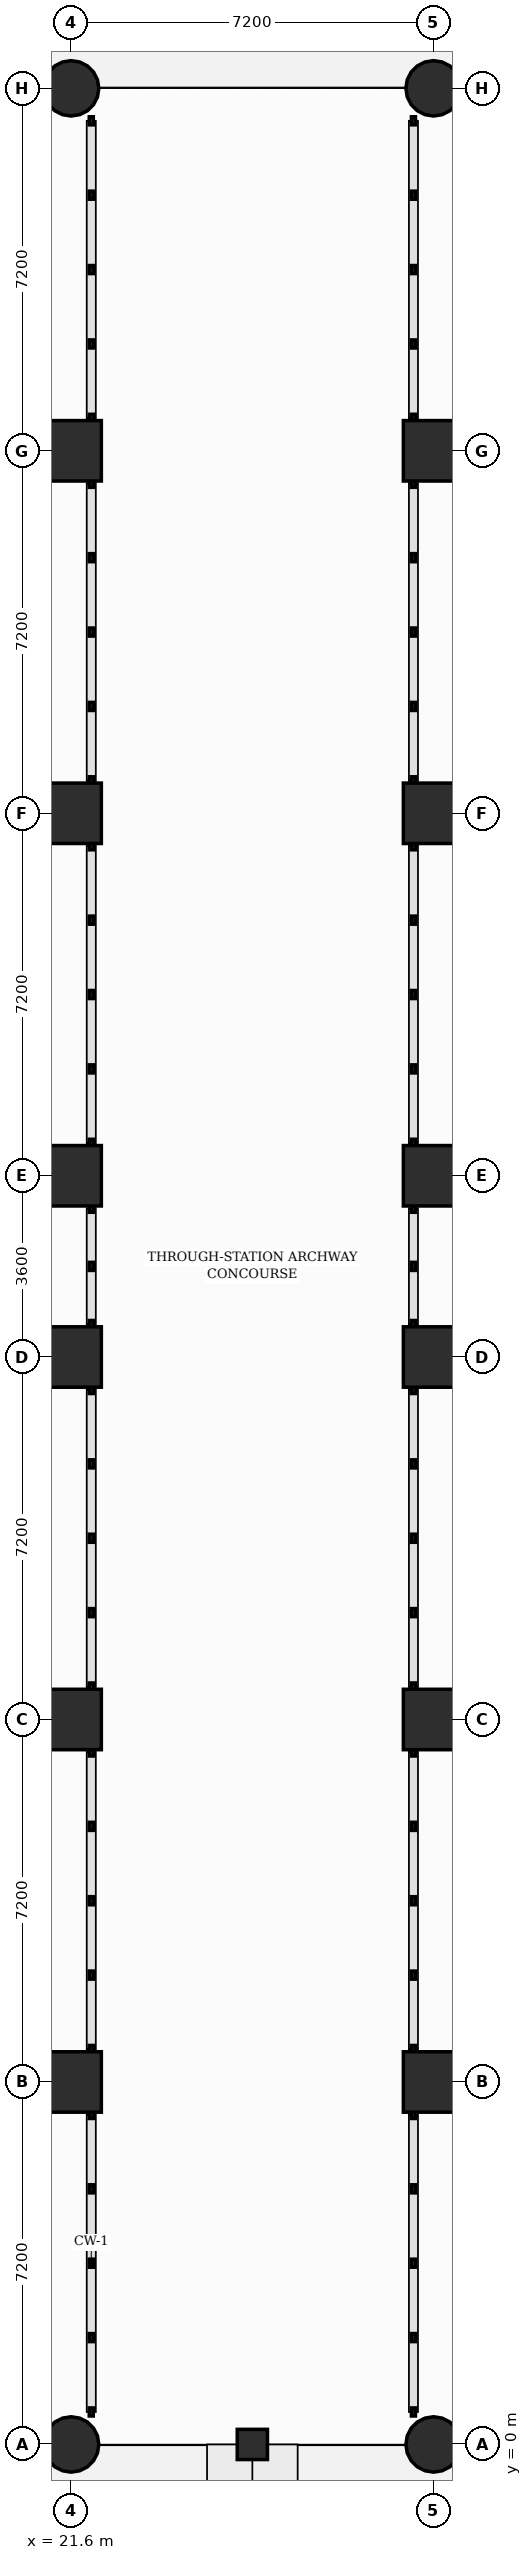
"""IFC4 building model, lengths in metres.
Left out: names, types, materials, properties, quantities, classifications, styles, units other than length and angle.
Written with IfcOpenShell. Run it as: python <this file> out.ifc"""

import sys

from ifc_helpers import new_model, si_unit, direction, frame, frame_2d, origin, origin_2d, place, context, subcontext, project, spatial, rectangle, circle, extrude, source, transform, mapped, element, save


model = new_model("IFC4")
c1 = context("Model", 3, precision=1e-05, world=origin(), true_north=direction((0.0, 1.0)))
c2 = subcontext(c1, "Body", "Model", "MODEL_VIEW")
j1 = project(units=[si_unit("LENGTHUNIT", "METRE"), si_unit("PLANEANGLEUNIT", "RADIAN")], contexts=[c1])
p1 = place(None, origin())
s1 = spatial("IfcSite", under=j1, at=p1, CompositionType="ELEMENT")
p2 = place(p1, origin())
s2 = spatial("IfcBuilding", under=s1, at=p2, CompositionType="ELEMENT")
p3 = place(p2, origin())
s3 = spatial("IfcBuildingStorey", under=s2, at=p3, CompositionType="ELEMENT", Elevation=0.0)
m1 = source(origin(), c2, "Body", "SweptSolid", [
    extrude(circle(Radius=0.55, at=origin_2d()), origin(), (0.0, 0.0, 1.0), 5.4),
])
p4 = place(p3, frame((21.6, 0.0, 0.0), z_axis=(0.0, 0.0, 1.0), x_axis=(1.0, 0.0, 0.0)))
e1 = element("IfcColumn", 1, at=p4, inside=s3, PredefinedType="COLUMN", context=c2, shape_type="MappedRepresentation", body=[
    mapped(m1, transform((0.0, 0.0, 0.0), scale=1.0)),
])
m2 = source(origin(), c2, "Body", "SweptSolid", [
    extrude(rectangle(XDim=1.2, YDim=1.2, at=origin_2d()), origin(), (0.0, 0.0, 1.0), 5.4),
])
for number, where, z_axis, x_axis in (
    (2, (21.6, 7.2, 0.0), (0.0, 0.0, 1.0), (1.0, 0.0, 0.0)),
    (3, (21.6, 14.4, 0.0), (0.0, 0.0, 1.0), (1.0, 0.0, 0.0)),
    (4, (21.6, 21.6, 0.0), (0.0, 0.0, 1.0), (1.0, 0.0, 0.0)),
    (5, (21.6, 25.2, 0.0), (0.0, 0.0, 1.0), (1.0, 0.0, 0.0)),
    (6, (21.6, 32.4, 0.0), (0.0, 0.0, 1.0), (1.0, 0.0, 0.0)),
    (7, (21.6, 39.6, 0.0), (0.0, 0.0, 1.0), (1.0, 0.0, 0.0)),
):
    element("IfcColumn", number, at=place(p3, frame(where, z_axis=z_axis, x_axis=x_axis)), inside=s3, PredefinedType="COLUMN", context=c2, shape_type="MappedRepresentation", body=[
        mapped(m2, transform((0.0, 0.0, 0.0), scale=1.0)),
    ])
for number, where, z_axis, x_axis in (
    (8, (21.6, 46.8, 0.0), (0.0, 0.0, 1.0), (1.0, 0.0, 0.0)),
    (9, (28.8, 0.0, 0.0), (0.0, 0.0, 1.0), (1.0, 0.0, 0.0)),
):
    element("IfcColumn", number, at=place(p3, frame(where, z_axis=z_axis, x_axis=x_axis)), inside=s3, PredefinedType="COLUMN", context=c2, shape_type="MappedRepresentation", body=[
        mapped(m1, transform((0.0, 0.0, 0.0), scale=1.0)),
    ])
for number, where, z_axis, x_axis in (
    (10, (28.8, 7.2, 0.0), (0.0, 0.0, 1.0), (1.0, 0.0, 0.0)),
    (11, (28.8, 14.4, 0.0), (0.0, 0.0, 1.0), (1.0, 0.0, 0.0)),
    (12, (28.8, 21.6, 0.0), (0.0, 0.0, 1.0), (1.0, 0.0, 0.0)),
    (13, (28.8, 25.2, 0.0), (0.0, 0.0, 1.0), (1.0, 0.0, 0.0)),
    (14, (28.8, 32.4, 0.0), (0.0, 0.0, 1.0), (1.0, 0.0, 0.0)),
    (15, (28.8, 39.6, 0.0), (0.0, 0.0, 1.0), (1.0, 0.0, 0.0)),
):
    element("IfcColumn", number, at=place(p3, frame(where, z_axis=z_axis, x_axis=x_axis)), inside=s3, PredefinedType="COLUMN", context=c2, shape_type="MappedRepresentation", body=[
        mapped(m2, transform((0.0, 0.0, 0.0), scale=1.0)),
    ])
p5 = place(p3, frame((28.8, 46.8, 0.0), z_axis=(0.0, 0.0, 1.0), x_axis=(1.0, 0.0, 0.0)))
e16 = element("IfcColumn", 16, at=p5, inside=s3, PredefinedType="COLUMN", context=c2, shape_type="MappedRepresentation", body=[
    mapped(m1, transform((0.0, 0.0, 0.0), scale=1.0)),
])
m3 = source(origin(), c2, "Body", "SweptSolid", [
    extrude(rectangle(XDim=0.6, YDim=0.6, at=origin_2d()), origin(), (0.0, 0.0, 1.0), 5.4),
])
p6 = place(p3, frame((25.2, 0.0, 0.0), z_axis=(0.0, 0.0, 1.0), x_axis=(1.0, 0.0, 0.0)))
e17 = element("IfcColumn", 17, at=p6, inside=s3, PredefinedType="PILASTER", context=c2, shape_type="MappedRepresentation", body=[
    mapped(m3, transform((0.0, 0.0, 0.0), scale=1.0)),
])
p7 = place(p3, frame((8.69, 14.35, 0.0), z_axis=(0.0, 0.0, 1.0), x_axis=(1.0, 0.0, 0.0)))
e18 = element("IfcWall", 18, at=p7, inside=s3, PredefinedType="PARTITIONING", context=c2, shape_type="SweptSolid", body=[
    extrude(rectangle(XDim=13.07, YDim=0.16, at=frame_2d((6.535, 0.0))), origin(), (0.0, 0.0, 1.0), 4.085),
])
p8 = place(p7, frame((7.71, 0.0, 0.0)))
e19 = element("IfcOpeningElement", 19, at=p8, cuts=e18, PredefinedType="OPENING", context=c2, shape_type="SweptSolid", body=[
    extrude(rectangle(XDim=1.6, YDim=2.4, at=frame_2d((0.8, 1.2))), frame((0.0, 0.09, 0.0), z_axis=(0.0, -1.0, 0.0), x_axis=(1.0, 0.0, 0.0)), (0.0, 0.0, 1.0), 0.18),
])
p9 = place(p3, frame((28.64, 14.35, 0.0), z_axis=(0.0, 0.0, 1.0), x_axis=(1.0, 0.0, 0.0)))
e20 = element("IfcWall", 20, at=p9, inside=s3, PredefinedType="PARTITIONING", context=c2, shape_type="SweptSolid", body=[
    extrude(rectangle(XDim=3.27, YDim=0.16, at=frame_2d((1.635, 0.0))), origin(), (0.0, 0.0, 1.0), 4.085),
])
p10 = place(p9, frame((0.935, 0.0, 0.0)))
e21 = element("IfcOpeningElement", 21, at=p10, cuts=e20, PredefinedType="OPENING", context=c2, shape_type="SweptSolid", body=[
    extrude(rectangle(XDim=1.4, YDim=2.35, at=frame_2d((0.7, 1.175))), frame((0.0, 0.09, 0.0), z_axis=(0.0, -1.0, 0.0), x_axis=(1.0, 0.0, 0.0)), (0.0, 0.0, 1.0), 0.18),
])
p11 = place(p3, frame((13.84, 39.6, 0.0), z_axis=(0.0, 0.0, 1.0), x_axis=(1.0, 0.0, 0.0)))
e22 = element("IfcWall", 22, at=p11, inside=s3, PredefinedType="PARTITIONING", context=c2, shape_type="SweptSolid", body=[
    extrude(rectangle(XDim=7.92, YDim=0.16, at=frame_2d((3.96, 0.0))), origin(), (0.0, 0.0, 1.0), 4.085),
])
p12 = place(p11, frame((1.22, 0.0, 0.0)))
e23 = element("IfcOpeningElement", 23, at=p12, cuts=e22, PredefinedType="OPENING", context=c2, shape_type="SweptSolid", body=[
    extrude(rectangle(XDim=1.6, YDim=2.4, at=frame_2d((0.8, 1.2))), frame((0.0, 0.09, 0.0), z_axis=(0.0, -1.0, 0.0), x_axis=(1.0, 0.0, 0.0)), (0.0, 0.0, 1.0), 0.18),
])
p13 = place(p3, frame((28.64, 39.6, 0.0), z_axis=(0.0, 0.0, 1.0), x_axis=(1.0, 0.0, 0.0)))
e24 = element("IfcWall", 24, at=p13, inside=s3, PredefinedType="PARTITIONING", context=c2, shape_type="SweptSolid", body=[
    extrude(rectangle(XDim=43.72, YDim=0.16, at=frame_2d((21.86, 0.0))), origin(), (0.0, 0.0, 1.0), 4.085),
])
p14 = place(p13, frame((7.76, 0.0, 0.0)))
e25 = element("IfcOpeningElement", 25, at=p14, cuts=e24, PredefinedType="OPENING", context=c2, shape_type="SweptSolid", body=[
    extrude(rectangle(XDim=1.6, YDim=2.4, at=frame_2d((0.8, 1.2))), frame((0.0, 0.09, 0.0), z_axis=(0.0, -1.0, 0.0), x_axis=(1.0, 0.0, 0.0)), (0.0, 0.0, 1.0), 0.18),
])
p15 = place(p13, frame((22.835, 0.0, 0.0)))
e26 = element("IfcOpeningElement", 26, at=p15, cuts=e24, PredefinedType="OPENING", context=c2, shape_type="SweptSolid", body=[
    extrude(rectangle(XDim=0.85, YDim=2.1, at=frame_2d((0.425, 1.05))), frame((0.0, 0.09, 0.0), z_axis=(0.0, -1.0, 0.0), x_axis=(1.0, 0.0, 0.0)), (0.0, 0.0, 1.0), 0.18),
])
p16 = place(p13, frame((30.835, 0.0, 0.0)))
e27 = element("IfcOpeningElement", 27, at=p16, cuts=e24, PredefinedType="OPENING", context=c2, shape_type="SweptSolid", body=[
    extrude(rectangle(XDim=0.85, YDim=2.1, at=frame_2d((0.425, 1.05))), frame((0.0, 0.09, 0.0), z_axis=(0.0, -1.0, 0.0), x_axis=(1.0, 0.0, 0.0)), (0.0, 0.0, 1.0), 0.18),
])
p17 = place(p13, frame((37.785, 0.0, 0.0)))
e28 = element("IfcOpeningElement", 28, at=p17, cuts=e24, PredefinedType="OPENING", context=c2, shape_type="SweptSolid", body=[
    extrude(rectangle(XDim=0.95, YDim=2.15, at=frame_2d((0.475, 1.075))), frame((0.0, 0.09, 0.0), z_axis=(0.0, -1.0, 0.0), x_axis=(1.0, 0.0, 0.0)), (0.0, 0.0, 1.0), 0.18),
])
p18 = place(p3, frame((-4.8, 0.0, 0.0), z_axis=(0.0, 0.0, 1.0), x_axis=(1.0, 0.0, 0.0)))
e29 = element("IfcWall", 29, at=p18, inside=s3, PredefinedType="SOLIDWALL", context=c2, shape_type="SweptSolid", body=[
    extrude(rectangle(XDim=26.85, YDim=0.32, at=frame_2d((13.425, 0.0))), origin(), (0.0, 0.0, 1.0), 4.085),
])
p19 = place(p18, frame((6.45, 0.0, 0.0)))
e30 = element("IfcOpeningElement", 30, at=p19, cuts=e29, PredefinedType="OPENING", context=c2, shape_type="SweptSolid", body=[
    extrude(rectangle(XDim=4.0, YDim=3.2, at=frame_2d((2.0, 1.6))), frame((0.0, 0.17, 0.0), z_axis=(0.0, -1.0, 0.0), x_axis=(1.0, 0.0, 0.0)), (0.0, 0.0, 1.0), 0.34),
])
p20 = place(p18, frame((21.6, 0.0, 0.0)))
e31 = element("IfcOpeningElement", 31, at=p20, cuts=e29, PredefinedType="OPENING", context=c2, shape_type="SweptSolid", body=[
    extrude(rectangle(XDim=2.4, YDim=2.8, at=frame_2d((1.2, 1.4))), frame((0.0, 0.17, 0.0), z_axis=(0.0, -1.0, 0.0), x_axis=(1.0, 0.0, 0.0)), (0.0, 0.0, 1.0), 0.34),
])
p21 = place(p3, frame((28.35, 0.0, 0.0), z_axis=(0.0, 0.0, 1.0), x_axis=(1.0, 0.0, 0.0)))
e32 = element("IfcWall", 32, at=p21, inside=s3, PredefinedType="SOLIDWALL", context=c2, shape_type="SweptSolid", body=[
    extrude(rectangle(XDim=52.05, YDim=0.32, at=frame_2d((26.025, 0.0))), origin(), (0.0, 0.0, 1.0), 4.085),
])
p22 = place(p21, frame((24.8, 0.0, 0.0)))
e33 = element("IfcOpeningElement", 33, at=p22, cuts=e32, PredefinedType="OPENING", context=c2, shape_type="SweptSolid", body=[
    extrude(rectangle(XDim=1.1, YDim=2.2, at=frame_2d((0.55, 1.1))), frame((0.0, 0.17, 0.0), z_axis=(0.0, -1.0, 0.0), x_axis=(1.0, 0.0, 0.0)), (0.0, 0.0, 1.0), 0.34),
])
p23 = place(p21, frame((33.65, 0.0, 0.0)))
e34 = element("IfcOpeningElement", 34, at=p23, cuts=e32, PredefinedType="OPENING", context=c2, shape_type="SweptSolid", body=[
    extrude(rectangle(XDim=2.4, YDim=2.8, at=frame_2d((1.2, 1.4))), frame((0.0, 0.17, 0.0), z_axis=(0.0, -1.0, 0.0), x_axis=(1.0, 0.0, 0.0)), (0.0, 0.0, 1.0), 0.34),
])
p24 = place(p3, frame((-4.8, 46.8, 0.0), z_axis=(0.0, 0.0, 1.0), x_axis=(1.0, 0.0, 0.0)))
e35 = element("IfcWall", 35, at=p24, inside=s3, PredefinedType="SOLIDWALL", context=c2, shape_type="SweptSolid", body=[
    extrude(rectangle(XDim=26.85, YDim=0.32, at=frame_2d((13.425, 0.0))), origin(), (0.0, 0.0, 1.0), 4.085),
])
save(model, sys.argv[1])
